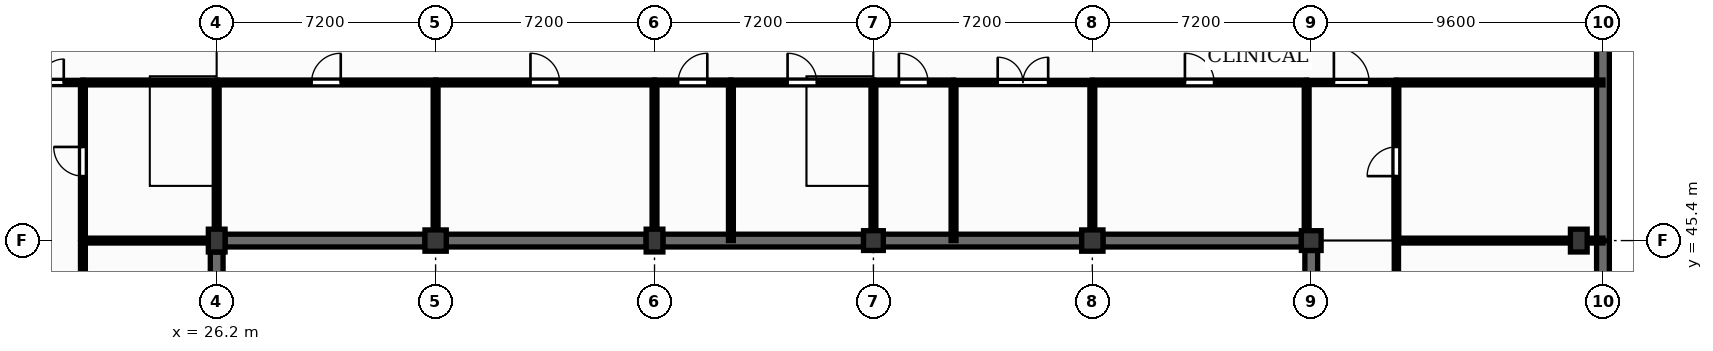
"""IFC4 building model, lengths in metres.
Left out: names, types, materials, properties, quantities, classifications, styles, units other than length and angle.
Written with IfcOpenShell. Run it as: python <this file> out.ifc"""

import sys

from ifc_helpers import new_model, si_unit, direction, frame, frame_2d, origin, origin_2d, place, context, subcontext, project, spatial, rectangle, extrude, element, fill, save


model = new_model("IFC4")
c1 = context("Model", 3, precision=1e-05, world=origin(), true_north=direction((0.0, 1.0)))
c2 = subcontext(c1, "Body", "Model", "MODEL_VIEW")
j1 = project(units=[si_unit("LENGTHUNIT", "METRE"), si_unit("PLANEANGLEUNIT", "RADIAN")], contexts=[c1])
p1 = place(None, origin())
s1 = spatial("IfcSite", under=j1, at=p1, CompositionType="ELEMENT")
p2 = place(p1, origin())
s2 = spatial("IfcBuilding", under=s1, at=p2, CompositionType="ELEMENT")
p3 = place(p2, frame((0.0, 0.0, -4.5)))
s3 = spatial("IfcBuildingStorey", under=s2, at=p3, CompositionType="ELEMENT", Elevation=-4.5)
p4 = place(p3, frame((26.2, 45.4, 0.0), z_axis=(0.0, 0.0, 1.0), x_axis=(1.0, 0.0, 0.0)))
e1 = element("IfcColumn", 1, at=p4, inside=s3, PredefinedType="COLUMN", context=c2, shape_type="SweptSolid", body=[
    extrude(rectangle(XDim=0.55, YDim=0.75, at=origin_2d()), origin(), (0.0, 0.0, 1.0), 4.2),
])
p5 = place(p3, frame((33.4, 45.4, 0.0), z_axis=(0.0, 0.0, 1.0), x_axis=(1.0, 0.0, 0.0)))
e2 = element("IfcColumn", 2, at=p5, inside=s3, PredefinedType="COLUMN", context=c2, shape_type="SweptSolid", body=[
    extrude(rectangle(XDim=0.7, YDim=0.7, at=origin_2d()), origin(), (0.0, 0.0, 1.0), 4.2),
])
p6 = place(p3, frame((40.6, 45.4, 0.0), z_axis=(0.0, 0.0, 1.0), x_axis=(1.0, 0.0, 0.0)))
e3 = element("IfcColumn", 3, at=p6, inside=s3, PredefinedType="COLUMN", context=c2, shape_type="SweptSolid", body=[
    extrude(rectangle(XDim=0.55, YDim=0.75, at=origin_2d()), origin(), (0.0, 0.0, 1.0), 4.2),
])
p7 = place(p3, frame((47.8, 45.4, 0.0), z_axis=(0.0, 0.0, 1.0), x_axis=(1.0, 0.0, 0.0)))
e4 = element("IfcColumn", 4, at=p7, inside=s3, PredefinedType="COLUMN", context=c2, shape_type="SweptSolid", body=[
    extrude(rectangle(XDim=0.65, YDim=0.65, at=origin_2d()), origin(), (0.0, 0.0, 1.0), 4.2),
])
p8 = place(p3, frame((55.0, 45.4, 0.0), z_axis=(0.0, 0.0, 1.0), x_axis=(1.0, 0.0, 0.0)))
e5 = element("IfcColumn", 5, at=p8, inside=s3, PredefinedType="COLUMN", context=c2, shape_type="SweptSolid", body=[
    extrude(rectangle(XDim=0.7, YDim=0.7, at=origin_2d()), origin(), (0.0, 0.0, 1.0), 4.2),
])
p9 = place(p3, frame((62.2, 45.4, 0.0), z_axis=(0.0, 0.0, 1.0), x_axis=(1.0, 0.0, 0.0)))
e6 = element("IfcColumn", 6, at=p9, inside=s3, PredefinedType="COLUMN", context=c2, shape_type="SweptSolid", body=[
    extrude(rectangle(XDim=0.65, YDim=0.65, at=origin_2d()), origin(), (0.0, 0.0, 1.0), 4.2),
])
p10 = place(p3, frame((71.0, 45.4, 0.0), z_axis=(0.0, 0.0, 1.0), x_axis=(1.0, 0.0, 0.0)))
e7 = element("IfcColumn", 7, at=p10, inside=s3, PredefinedType="COLUMN", context=c2, shape_type="SweptSolid", body=[
    extrude(rectangle(XDim=0.55, YDim=0.75, at=origin_2d()), origin(), (0.0, 0.0, 1.0), 4.2),
])
p11 = place(p3, frame((26.2, 37.175, 0.0), z_axis=(0.0, 0.0, 1.0), x_axis=(0.0, 1.0, 0.0)))
e8 = element("IfcWall", 8, at=p11, inside=s3, PredefinedType="USERDEFINED", context=c2, shape_type="SweptSolid", body=[
    extrude(rectangle(XDim=7.85, YDim=0.42, at=frame_2d((3.925, 0.0))), origin(), (0.0, 0.0, 1.0), 4.2),
])
for number, where, z_axis, x_axis in (
    (9, (26.475, 45.4, 0.0), (0.0, 0.0, 1.0), (1.0, 0.0, 0.0)),
    (10, (33.75, 45.4, 0.0), (0.0, 0.0, 1.0), (1.0, 0.0, 0.0)),
):
    element("IfcWall", number, at=place(p3, frame(where, z_axis=z_axis, x_axis=x_axis)), inside=s3, PredefinedType="USERDEFINED", context=c2, shape_type="SweptSolid", body=[
        extrude(rectangle(XDim=6.575, YDim=0.42, at=frame_2d((3.288, 0.0))), origin(), (0.0, 0.0, 1.0), 4.2),
    ])
p12 = place(p3, frame((40.875, 45.4, 0.0), z_axis=(0.0, 0.0, 1.0), x_axis=(1.0, 0.0, 0.0)))
e11 = element("IfcWall", 11, at=p12, inside=s3, PredefinedType="USERDEFINED", context=c2, shape_type="SweptSolid", body=[
    extrude(rectangle(XDim=6.6, YDim=0.42, at=frame_2d((3.3, 0.0))), origin(), (0.0, 0.0, 1.0), 4.2),
])
for number, where, z_axis, x_axis in (
    (12, (48.125, 45.4, 0.0), (0.0, 0.0, 1.0), (1.0, 0.0, 0.0)),
    (13, (55.35, 45.4, 0.0), (0.0, 0.0, 1.0), (1.0, 0.0, 0.0)),
):
    element("IfcWall", number, at=place(p3, frame(where, z_axis=z_axis, x_axis=x_axis)), inside=s3, PredefinedType="USERDEFINED", context=c2, shape_type="SweptSolid", body=[
        extrude(rectangle(XDim=6.525, YDim=0.42, at=frame_2d((3.262, 0.0))), origin(), (0.0, 0.0, 1.0), 4.2),
    ])
p13 = place(p3, frame((62.2, 37.15, 0.0), z_axis=(0.0, 0.0, 1.0), x_axis=(0.0, 1.0, 0.0)))
e14 = element("IfcWall", 14, at=p13, inside=s3, PredefinedType="USERDEFINED", context=c2, shape_type="SweptSolid", body=[
    extrude(rectangle(XDim=7.925, YDim=0.42, at=frame_2d((3.962, 0.0))), origin(), (0.0, 0.0, 1.0), 4.2),
])
p14 = place(p3, frame((71.795, 36.8, 0.0), z_axis=(0.0, 0.0, 1.0), x_axis=(0.0, 1.0, 0.0)))
e15 = element("IfcWall", 15, at=p14, inside=s3, PredefinedType="USERDEFINED", context=c2, shape_type="SweptSolid", body=[
    extrude(rectangle(XDim=8.6, YDim=0.42, at=frame_2d((4.3, 0.0))), origin(), (0.0, 0.0, 1.0), 4.2),
])
p15 = place(p3, frame((71.795, 45.4, 0.0), z_axis=(0.0, 0.0, 1.0), x_axis=(0.0, 1.0, 0.0)))
e16 = element("IfcWall", 16, at=p15, inside=s3, PredefinedType="USERDEFINED", context=c2, shape_type="SweptSolid", body=[
    extrude(rectangle(XDim=7.2, YDim=0.42, at=frame_2d((3.6, 0.0))), origin(), (0.0, 0.0, 1.0), 4.2),
])
p16 = place(p3, frame((19.0, 50.6, 0.0), z_axis=(0.0, 0.0, 1.0), x_axis=(1.0, 0.0, 0.0)))
e17 = element("IfcWall", 17, at=p16, inside=s3, PredefinedType="PARTITIONING", context=c2, shape_type="SweptSolid", body=[
    extrude(rectangle(XDim=2.8, YDim=0.14, at=frame_2d((1.4, 0.0))), origin(), (0.0, 0.0, 1.0), 4.08),
])
p17 = place(p16, frame((0.63, 0.0, 0.0)))
e18 = element("IfcOpeningElement", 18, at=p17, cuts=e17, PredefinedType="OPENING", context=c2, shape_type="SweptSolid", body=[
    extrude(rectangle(XDim=1.54, YDim=2.25, at=frame_2d((0.77, 1.125))), frame((0.0, 0.08, 0.0), z_axis=(0.0, -1.0, 0.0), x_axis=(1.0, 0.0, 0.0)), (0.0, 0.0, 1.0), 0.16),
])
p18 = place(p3, frame((21.8, 36.87, 0.0), z_axis=(0.0, 0.0, 1.0), x_axis=(0.0, 1.0, 0.0)))
e19 = element("IfcWall", 19, at=p18, inside=s3, PredefinedType="PARTITIONING", context=c2, shape_type="SweptSolid", body=[
    extrude(rectangle(XDim=8.46, YDim=0.16, at=frame_2d((4.23, 0.0))), origin(), (0.0, 0.0, 1.0), 4.08),
])
p19 = place(p18, frame((3.75, 0.0, 0.0)))
e20 = element("IfcOpeningElement", 20, at=p19, cuts=e19, PredefinedType="OPENING", context=c2, shape_type="SweptSolid", body=[
    extrude(rectangle(XDim=0.96, YDim=2.1, at=frame_2d((0.48, 1.05))), frame((0.0, 0.09, 0.0), z_axis=(0.0, -1.0, 0.0), x_axis=(1.0, 0.0, 0.0)), (0.0, 0.0, 1.0), 0.18),
])
p20 = place(p3, frame((21.8, 45.47, 0.0), z_axis=(0.0, 0.0, 1.0), x_axis=(0.0, 1.0, 0.0)))
e21 = element("IfcWall", 21, at=p20, inside=s3, PredefinedType="PARTITIONING", context=c2, shape_type="SweptSolid", body=[
    extrude(rectangle(XDim=5.06, YDim=0.16, at=frame_2d((2.53, 0.0))), origin(), (0.0, 0.0, 1.0), 4.08),
])
p21 = place(p20, frame((2.05, 0.0, 0.0)))
e22 = element("IfcOpeningElement", 22, at=p21, cuts=e21, PredefinedType="OPENING", context=c2, shape_type="SweptSolid", body=[
    extrude(rectangle(XDim=0.96, YDim=2.1, at=frame_2d((0.48, 1.05))), frame((0.0, 0.09, 0.0), z_axis=(0.0, -1.0, 0.0), x_axis=(1.0, 0.0, 0.0)), (0.0, 0.0, 1.0), 0.18),
])
p22 = place(p3, frame((21.8, 45.4, 0.0), z_axis=(0.0, 0.0, 1.0), x_axis=(1.0, 0.0, 0.0)))
e23 = element("IfcWall", 23, at=p22, inside=s3, PredefinedType="PARTITIONING", context=c2, shape_type="SweptSolid", body=[
    extrude(rectangle(XDim=4.125, YDim=0.16, at=frame_2d((2.062, 0.0))), origin(), (0.0, 0.0, 1.0), 3.6),
])
p23 = place(p3, frame((21.8, 50.6, 0.0), z_axis=(0.0, 0.0, 1.0), x_axis=(1.0, 0.0, 0.0)))
e24 = element("IfcWall", 24, at=p23, inside=s3, PredefinedType="PARTITIONING", context=c2, shape_type="SweptSolid", body=[
    extrude(rectangle(XDim=4.4, YDim=0.16, at=frame_2d((2.2, 0.0))), origin(), (0.0, 0.0, 1.0), 4.08),
])
p24 = place(p3, frame((26.2, 45.775, 0.0), z_axis=(0.0, 0.0, 1.0), x_axis=(0.0, 1.0, 0.0)))
e25 = element("IfcWall", 25, at=p24, inside=s3, PredefinedType="PARTITIONING", context=c2, shape_type="SweptSolid", body=[
    extrude(rectangle(XDim=4.755, YDim=0.16, at=frame_2d((2.377, 0.0))), origin(), (0.0, 0.0, 1.0), 3.5),
])
p25 = place(p3, frame((26.2, 50.6, 0.0), z_axis=(0.0, 0.0, 1.0), x_axis=(1.0, 0.0, 0.0)))
e26 = element("IfcWall", 26, at=p25, inside=s3, PredefinedType="PARTITIONING", context=c2, shape_type="SweptSolid", body=[
    extrude(rectangle(XDim=7.2, YDim=0.16, at=frame_2d((3.6, 0.0))), origin(), (0.0, 0.0, 1.0), 4.08),
])
p26 = place(p25, frame((3.12, 0.0, 0.0)))
e27 = element("IfcOpeningElement", 27, at=p26, cuts=e26, PredefinedType="OPENING", context=c2, shape_type="SweptSolid", body=[
    extrude(rectangle(XDim=0.96, YDim=2.1, at=frame_2d((0.48, 1.05))), frame((0.0, 0.09, 0.0), z_axis=(0.0, -1.0, 0.0), x_axis=(1.0, 0.0, 0.0)), (0.0, 0.0, 1.0), 0.18),
])
p27 = place(p3, frame((33.4, 45.75, 0.0), z_axis=(0.0, 0.0, 1.0), x_axis=(0.0, 1.0, 0.0)))
e28 = element("IfcWall", 28, at=p27, inside=s3, PredefinedType="PARTITIONING", context=c2, shape_type="SweptSolid", body=[
    extrude(rectangle(XDim=4.78, YDim=0.16, at=frame_2d((2.39, 0.0))), origin(), (0.0, 0.0, 1.0), 3.5),
])
p28 = place(p3, frame((33.4, 50.6, 0.0), z_axis=(0.0, 0.0, 1.0), x_axis=(1.0, 0.0, 0.0)))
e29 = element("IfcWall", 29, at=p28, inside=s3, PredefinedType="PARTITIONING", context=c2, shape_type="SweptSolid", body=[
    extrude(rectangle(XDim=7.2, YDim=0.16, at=frame_2d((3.6, 0.0))), origin(), (0.0, 0.0, 1.0), 4.08),
])
p29 = place(p28, frame((3.12, 0.0, 0.0)))
e30 = element("IfcOpeningElement", 30, at=p29, cuts=e29, PredefinedType="OPENING", context=c2, shape_type="SweptSolid", body=[
    extrude(rectangle(XDim=0.96, YDim=2.1, at=frame_2d((0.48, 1.05))), frame((0.0, 0.09, 0.0), z_axis=(0.0, -1.0, 0.0), x_axis=(1.0, 0.0, 0.0)), (0.0, 0.0, 1.0), 0.18),
])
p30 = place(p3, frame((40.6, 45.775, 0.0), z_axis=(0.0, 0.0, 1.0), x_axis=(0.0, 1.0, 0.0)))
e31 = element("IfcWall", 31, at=p30, inside=s3, PredefinedType="PARTITIONING", context=c2, shape_type="SweptSolid", body=[
    extrude(rectangle(XDim=4.755, YDim=0.16, at=frame_2d((2.377, 0.0))), origin(), (0.0, 0.0, 1.0), 3.5),
])
p31 = place(p3, frame((40.6, 50.6, 0.0), z_axis=(0.0, 0.0, 1.0), x_axis=(1.0, 0.0, 0.0)))
e32 = element("IfcWall", 32, at=p31, inside=s3, PredefinedType="PARTITIONING", context=c2, shape_type="SweptSolid", body=[
    extrude(rectangle(XDim=2.513, YDim=0.16, at=frame_2d((1.256, 0.0))), origin(), (0.0, 0.0, 1.0), 4.08),
])
p32 = place(p31, frame((0.777, 0.0, 0.0)))
e33 = element("IfcOpeningElement", 33, at=p32, cuts=e32, PredefinedType="OPENING", context=c2, shape_type="SweptSolid", body=[
    extrude(rectangle(XDim=0.96, YDim=2.1, at=frame_2d((0.48, 1.05))), frame((0.0, 0.09, 0.0), z_axis=(0.0, -1.0, 0.0), x_axis=(1.0, 0.0, 0.0)), (0.0, 0.0, 1.0), 0.18),
])
p33 = place(p3, frame((43.113, 45.4, 0.0), z_axis=(0.0, 0.0, 1.0), x_axis=(0.0, 1.0, 0.0)))
e34 = element("IfcWall", 34, at=p33, inside=s3, PredefinedType="PARTITIONING", context=c2, shape_type="SweptSolid", body=[
    extrude(rectangle(XDim=5.13, YDim=0.16, at=frame_2d((2.565, 0.0))), origin(), (0.0, 0.0, 1.0), 4.08),
])
p34 = place(p3, frame((43.113, 50.6, 0.0), z_axis=(0.0, 0.0, 1.0), x_axis=(1.0, 0.0, 0.0)))
e35 = element("IfcWall", 35, at=p34, inside=s3, PredefinedType="PARTITIONING", context=c2, shape_type="SweptSolid", body=[
    extrude(rectangle(XDim=4.687, YDim=0.16, at=frame_2d((2.344, 0.0))), origin(), (0.0, 0.0, 1.0), 4.08),
])
p35 = place(p34, frame((1.864, 0.0, 0.0)))
e36 = element("IfcOpeningElement", 36, at=p35, cuts=e35, PredefinedType="OPENING", context=c2, shape_type="SweptSolid", body=[
    extrude(rectangle(XDim=0.96, YDim=2.1, at=frame_2d((0.48, 1.05))), frame((0.0, 0.09, 0.0), z_axis=(0.0, -1.0, 0.0), x_axis=(1.0, 0.0, 0.0)), (0.0, 0.0, 1.0), 0.18),
])
p36 = place(p3, frame((47.8, 45.725, 0.0), z_axis=(0.0, 0.0, 1.0), x_axis=(0.0, 1.0, 0.0)))
e37 = element("IfcWall", 37, at=p36, inside=s3, PredefinedType="PARTITIONING", context=c2, shape_type="SweptSolid", body=[
    extrude(rectangle(XDim=4.805, YDim=0.16, at=frame_2d((2.402, 0.0))), origin(), (0.0, 0.0, 1.0), 3.5),
])
p37 = place(p3, frame((47.8, 50.6, 0.0), z_axis=(0.0, 0.0, 1.0), x_axis=(1.0, 0.0, 0.0)))
e38 = element("IfcWall", 38, at=p37, inside=s3, PredefinedType="PARTITIONING", context=c2, shape_type="SweptSolid", body=[
    extrude(rectangle(XDim=2.635, YDim=0.16, at=frame_2d((1.317, 0.0))), origin(), (0.0, 0.0, 1.0), 4.08),
])
p38 = place(p37, frame((0.837, 0.0, 0.0)))
e39 = element("IfcOpeningElement", 39, at=p38, cuts=e38, PredefinedType="OPENING", context=c2, shape_type="SweptSolid", body=[
    extrude(rectangle(XDim=0.96, YDim=2.1, at=frame_2d((0.48, 1.05))), frame((0.0, 0.09, 0.0), z_axis=(0.0, -1.0, 0.0), x_axis=(1.0, 0.0, 0.0)), (0.0, 0.0, 1.0), 0.18),
])
p39 = place(p3, frame((50.435, 45.4, 0.0), z_axis=(0.0, 0.0, 1.0), x_axis=(0.0, 1.0, 0.0)))
e40 = element("IfcWall", 40, at=p39, inside=s3, PredefinedType="PARTITIONING", context=c2, shape_type="SweptSolid", body=[
    extrude(rectangle(XDim=5.13, YDim=0.16, at=frame_2d((2.565, 0.0))), origin(), (0.0, 0.0, 1.0), 4.08),
])
p40 = place(p3, frame((50.435, 50.6, 0.0), z_axis=(0.0, 0.0, 1.0), x_axis=(1.0, 0.0, 0.0)))
e41 = element("IfcWall", 41, at=p40, inside=s3, PredefinedType="PARTITIONING", context=c2, shape_type="SweptSolid", body=[
    extrude(rectangle(XDim=4.565, YDim=0.14, at=frame_2d((2.282, 0.0))), origin(), (0.0, 0.0, 1.0), 4.08),
])
p41 = place(p40, frame((1.452, 0.0, 0.0)))
e42 = element("IfcOpeningElement", 42, at=p41, cuts=e41, PredefinedType="OPENING", context=c2, shape_type="SweptSolid", body=[
    extrude(rectangle(XDim=1.66, YDim=2.3, at=frame_2d((0.83, 1.15))), frame((0.0, 0.08, 0.0), z_axis=(0.0, -1.0, 0.0), x_axis=(1.0, 0.0, 0.0)), (0.0, 0.0, 1.0), 0.16),
])
p42 = place(p3, frame((55.0, 45.75, 0.0), z_axis=(0.0, 0.0, 1.0), x_axis=(0.0, 1.0, 0.0)))
e43 = element("IfcWall", 43, at=p42, inside=s3, PredefinedType="PARTITIONING", context=c2, shape_type="SweptSolid", body=[
    extrude(rectangle(XDim=4.78, YDim=0.16, at=frame_2d((2.39, 0.0))), origin(), (0.0, 0.0, 1.0), 3.5),
])
p43 = place(p3, frame((55.0, 50.6, 0.0), z_axis=(0.0, 0.0, 1.0), x_axis=(1.0, 0.0, 0.0)))
e44 = element("IfcWall", 44, at=p43, inside=s3, PredefinedType="PARTITIONING", context=c2, shape_type="SweptSolid", body=[
    extrude(rectangle(XDim=7.05, YDim=0.16, at=frame_2d((3.525, 0.0))), origin(), (0.0, 0.0, 1.0), 4.08),
])
p44 = place(p43, frame((3.045, 0.0, 0.0)))
e45 = element("IfcOpeningElement", 45, at=p44, cuts=e44, PredefinedType="OPENING", context=c2, shape_type="SweptSolid", body=[
    extrude(rectangle(XDim=0.96, YDim=2.1, at=frame_2d((0.48, 1.05))), frame((0.0, 0.09, 0.0), z_axis=(0.0, -1.0, 0.0), x_axis=(1.0, 0.0, 0.0)), (0.0, 0.0, 1.0), 0.18),
])
p45 = place(p3, frame((62.05, 45.725, 0.0), z_axis=(0.0, 0.0, 1.0), x_axis=(0.0, 1.0, 0.0)))
e46 = element("IfcWall", 46, at=p45, inside=s3, PredefinedType="PARTITIONING", context=c2, shape_type="SweptSolid", body=[
    extrude(rectangle(XDim=4.805, YDim=0.16, at=frame_2d((2.402, 0.0))), origin(), (0.0, 0.0, 1.0), 3.5),
])
p46 = place(p3, frame((62.05, 50.6, 0.0), z_axis=(0.0, 0.0, 1.0), x_axis=(1.0, 0.0, 0.0)))
e47 = element("IfcWall", 47, at=p46, inside=s3, PredefinedType="PARTITIONING", context=c2, shape_type="SweptSolid", body=[
    extrude(rectangle(XDim=2.95, YDim=0.14, at=frame_2d((1.475, 0.0))), origin(), (0.0, 0.0, 1.0), 4.08),
])
p47 = place(p46, frame((0.895, 0.0, 0.0)))
e48 = element("IfcOpeningElement", 48, at=p47, cuts=e47, PredefinedType="OPENING", context=c2, shape_type="SweptSolid", body=[
    extrude(rectangle(XDim=1.16, YDim=2.1, at=frame_2d((0.58, 1.05))), frame((0.0, 0.08, 0.0), z_axis=(0.0, -1.0, 0.0), x_axis=(1.0, 0.0, 0.0)), (0.0, 0.0, 1.0), 0.16),
])
p48 = place(p3, frame((65.0, 36.87, 0.0), z_axis=(0.0, 0.0, 1.0), x_axis=(0.0, 1.0, 0.0)))
e49 = element("IfcWall", 49, at=p48, inside=s3, PredefinedType="PARTITIONING", context=c2, shape_type="SweptSolid", body=[
    extrude(rectangle(XDim=8.46, YDim=0.14, at=frame_2d((4.23, 0.0))), origin(), (0.0, 0.0, 1.0), 4.08),
])
p49 = place(p48, frame((3.68, 0.0, 0.0)))
e50 = element("IfcOpeningElement", 50, at=p49, cuts=e49, PredefinedType="OPENING", context=c2, shape_type="SweptSolid", body=[
    extrude(rectangle(XDim=1.1, YDim=2.1, at=frame_2d((0.55, 1.05))), frame((0.0, 0.08, 0.0), z_axis=(0.0, -1.0, 0.0), x_axis=(1.0, 0.0, 0.0)), (0.0, 0.0, 1.0), 0.16),
])
p50 = place(p3, frame((65.0, 45.47, 0.0), z_axis=(0.0, 0.0, 1.0), x_axis=(0.0, 1.0, 0.0)))
e51 = element("IfcWall", 51, at=p50, inside=s3, PredefinedType="PARTITIONING", context=c2, shape_type="SweptSolid", body=[
    extrude(rectangle(XDim=5.06, YDim=0.16, at=frame_2d((2.53, 0.0))), origin(), (0.0, 0.0, 1.0), 4.08),
])
p51 = place(p50, frame((2.05, 0.0, 0.0)))
e52 = element("IfcOpeningElement", 52, at=p51, cuts=e51, PredefinedType="OPENING", context=c2, shape_type="SweptSolid", body=[
    extrude(rectangle(XDim=0.96, YDim=2.1, at=frame_2d((0.48, 1.05))), frame((0.0, 0.09, 0.0), z_axis=(0.0, -1.0, 0.0), x_axis=(1.0, 0.0, 0.0)), (0.0, 0.0, 1.0), 0.18),
])
p52 = place(p3, frame((65.0, 45.4, 0.0), z_axis=(0.0, 0.0, 1.0), x_axis=(1.0, 0.0, 0.0)))
e53 = element("IfcWall", 53, at=p52, inside=s3, PredefinedType="PARTITIONING", context=c2, shape_type="SweptSolid", body=[
    extrude(rectangle(XDim=5.725, YDim=0.16, at=frame_2d((2.863, 0.0))), origin(), (0.0, 0.0, 1.0), 3.4),
])
p53 = place(p3, frame((71.275, 45.4, 0.0), z_axis=(0.0, 0.0, 1.0), x_axis=(1.0, 0.0, 0.0)))
e54 = element("IfcWall", 54, at=p53, inside=s3, PredefinedType="PARTITIONING", context=c2, shape_type="SweptSolid", body=[
    extrude(rectangle(XDim=0.52, YDim=0.16, at=frame_2d((0.26, 0.0))), origin(), (0.0, 0.0, 1.0), 4.08),
])
p54 = place(p3, frame((65.0, 50.6, 0.0), z_axis=(0.0, 0.0, 1.0), x_axis=(1.0, 0.0, 0.0)))
e55 = element("IfcWall", 55, at=p54, inside=s3, PredefinedType="PARTITIONING", context=c2, shape_type="SweptSolid", body=[
    extrude(rectangle(XDim=6.795, YDim=0.16, at=frame_2d((3.397, 0.0))), origin(), (0.0, 0.0, 1.0), 4.08),
])
p55 = place(p17, origin())
e56 = element("IfcDoor", 56, at=p55, inside=s3, OperationType="DOUBLE_DOOR_SINGLE_SWING", PredefinedType="DOOR", context=c2, shape_type="SweptSolid", body=[
    extrude(rectangle(XDim=1.54, YDim=2.25, at=frame_2d((0.77, 1.125))), frame((0.0, 0.025, 0.0), z_axis=(0.0, -1.0, 0.0), x_axis=(1.0, 0.0, 0.0)), (0.0, 0.0, 1.0), 0.05),
])
fill(e18, e56)
p56 = place(p47, origin())
e57 = element("IfcDoor", 57, at=p56, inside=s3, OperationType="SINGLE_SWING_LEFT", PredefinedType="DOOR", context=c2, shape_type="SweptSolid", body=[
    extrude(rectangle(XDim=1.16, YDim=2.1, at=frame_2d((0.58, 1.05))), frame((0.0, 0.025, 0.0), z_axis=(0.0, -1.0, 0.0), x_axis=(1.0, 0.0, 0.0)), (0.0, 0.0, 1.0), 0.05),
])
fill(e48, e57)
p57 = place(p21, origin())
e58 = element("IfcDoor", 58, at=p57, inside=s3, OperationType="SINGLE_SWING_RIGHT", PredefinedType="DOOR", context=c2, shape_type="SweptSolid", body=[
    extrude(rectangle(XDim=0.96, YDim=2.1, at=frame_2d((0.48, 1.05))), frame((0.0, 0.025, 0.0), z_axis=(0.0, -1.0, 0.0), x_axis=(1.0, 0.0, 0.0)), (0.0, 0.0, 1.0), 0.05),
])
fill(e22, e58)
p58 = place(p26, origin())
e59 = element("IfcDoor", 59, at=p58, inside=s3, OperationType="SINGLE_SWING_RIGHT", PredefinedType="DOOR", context=c2, shape_type="SweptSolid", body=[
    extrude(rectangle(XDim=0.96, YDim=2.1, at=frame_2d((0.48, 1.05))), frame((0.0, 0.025, 0.0), z_axis=(0.0, -1.0, 0.0), x_axis=(1.0, 0.0, 0.0)), (0.0, 0.0, 1.0), 0.05),
])
fill(e27, e59)
p59 = place(p29, origin())
e60 = element("IfcDoor", 60, at=p59, inside=s3, OperationType="SINGLE_SWING_LEFT", PredefinedType="DOOR", context=c2, shape_type="SweptSolid", body=[
    extrude(rectangle(XDim=0.96, YDim=2.1, at=frame_2d((0.48, 1.05))), frame((0.0, 0.025, 0.0), z_axis=(0.0, -1.0, 0.0), x_axis=(1.0, 0.0, 0.0)), (0.0, 0.0, 1.0), 0.05),
])
fill(e30, e60)
p60 = place(p32, origin())
e61 = element("IfcDoor", 61, at=p60, inside=s3, OperationType="SINGLE_SWING_RIGHT", PredefinedType="DOOR", context=c2, shape_type="SweptSolid", body=[
    extrude(rectangle(XDim=0.96, YDim=2.1, at=frame_2d((0.48, 1.05))), frame((0.0, 0.025, 0.0), z_axis=(0.0, -1.0, 0.0), x_axis=(1.0, 0.0, 0.0)), (0.0, 0.0, 1.0), 0.05),
])
fill(e33, e61)
p61 = place(p35, origin())
e62 = element("IfcDoor", 62, at=p61, inside=s3, OperationType="SINGLE_SWING_LEFT", PredefinedType="DOOR", context=c2, shape_type="SweptSolid", body=[
    extrude(rectangle(XDim=0.96, YDim=2.1, at=frame_2d((0.48, 1.05))), frame((0.0, 0.025, 0.0), z_axis=(0.0, -1.0, 0.0), x_axis=(1.0, 0.0, 0.0)), (0.0, 0.0, 1.0), 0.05),
])
fill(e36, e62)
p62 = place(p38, origin())
e63 = element("IfcDoor", 63, at=p62, inside=s3, OperationType="SINGLE_SWING_LEFT", PredefinedType="DOOR", context=c2, shape_type="SweptSolid", body=[
    extrude(rectangle(XDim=0.96, YDim=2.1, at=frame_2d((0.48, 1.05))), frame((0.0, 0.025, 0.0), z_axis=(0.0, -1.0, 0.0), x_axis=(1.0, 0.0, 0.0)), (0.0, 0.0, 1.0), 0.05),
])
fill(e39, e63)
p63 = place(p41, origin())
e64 = element("IfcDoor", 64, at=p63, inside=s3, OperationType="DOUBLE_DOOR_SINGLE_SWING", PredefinedType="DOOR", context=c2, shape_type="SweptSolid", body=[
    extrude(rectangle(XDim=1.66, YDim=2.3, at=frame_2d((0.83, 1.15))), frame((0.0, 0.025, 0.0), z_axis=(0.0, -1.0, 0.0), x_axis=(1.0, 0.0, 0.0)), (0.0, 0.0, 1.0), 0.05),
])
fill(e42, e64)
p64 = place(p44, origin())
e65 = element("IfcDoor", 65, at=p64, inside=s3, OperationType="SINGLE_SWING_LEFT", PredefinedType="DOOR", context=c2, shape_type="SweptSolid", body=[
    extrude(rectangle(XDim=0.96, YDim=2.1, at=frame_2d((0.48, 1.05))), frame((0.0, 0.025, 0.0), z_axis=(0.0, -1.0, 0.0), x_axis=(1.0, 0.0, 0.0)), (0.0, 0.0, 1.0), 0.05),
])
fill(e45, e65)
p65 = place(p51, origin())
e66 = element("IfcDoor", 66, at=p65, inside=s3, OperationType="SINGLE_SWING_LEFT", PredefinedType="DOOR", context=c2, shape_type="SweptSolid", body=[
    extrude(rectangle(XDim=0.96, YDim=2.1, at=frame_2d((0.48, 1.05))), frame((0.0, 0.025, 0.0), z_axis=(0.0, -1.0, 0.0), x_axis=(1.0, 0.0, 0.0)), (0.0, 0.0, 1.0), 0.05),
])
fill(e52, e66)
save(model, sys.argv[1])
